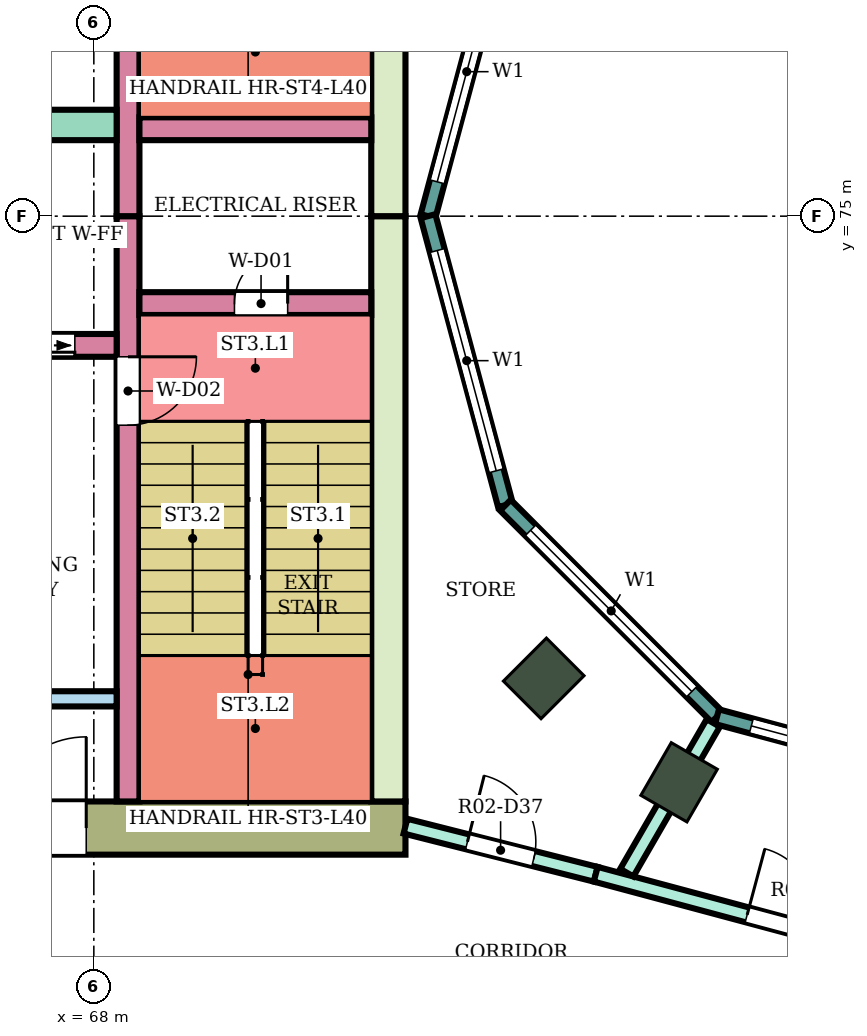
"""IFC4 building model, lengths in metres.
Left out: names, types, materials, properties, quantities, classifications, styles, units other than length and angle.
Written with IfcOpenShell. Run it as: python <this file> out.ifc"""

import sys

from ifc_helpers import new_model, si_unit, direction, frame, frame_2d, origin, origin_2d, place, context, subcontext, project, spatial, rectangle, extrude, element, fill, save


model = new_model("IFC4")
c1 = context("Model", 3, precision=1e-05, world=origin(), true_north=direction((0.0, 1.0)))
c2 = subcontext(c1, "Body", "Model", "MODEL_VIEW")
j1 = project(units=[si_unit("LENGTHUNIT", "METRE"), si_unit("PLANEANGLEUNIT", "RADIAN")], contexts=[c1])
p1 = place(None, origin())
s1 = spatial("IfcSite", under=j1, at=p1, CompositionType="ELEMENT")
p2 = place(p1, origin())
s2 = spatial("IfcBuilding", under=s1, at=p2, CompositionType="ELEMENT")
p3 = place(p2, frame((0.0, 0.0, 174.1)))
s3 = spatial("IfcBuildingStorey", under=s2, at=p3, CompositionType="ELEMENT", Elevation=174.1)
for number, where, z_axis, x_axis in (
    (1, (73.919, 68.919, 0.0), (0.0, 0.0, 1.0), (-0.707, -0.707, 0.0)),
    (2, (75.7, 67.552, 0.0), (0.0, 0.0, 1.0), (-0.5, -0.866, 0.0)),
):
    element("IfcColumn", number, at=place(p3, frame(where, z_axis=z_axis, x_axis=x_axis)), inside=s3, PredefinedType="COLUMN", context=c2, shape_type="SweptSolid", body=[
        extrude(rectangle(XDim=0.8, YDim=0.7, at=origin_2d()), origin(), (0.0, 0.0, 1.0), 4.1),
    ])
p4 = place(p3, frame((72.1, 66.95, 0.0), z_axis=(0.0, 0.0, 1.0), x_axis=(-1.0, 0.0, 0.0)))
e3 = element("IfcWall", 3, at=p4, inside=s3, PredefinedType="SHEAR", context=c2, shape_type="SweptSolid", body=[
    extrude(rectangle(XDim=14.8, YDim=0.7, at=frame_2d((7.4, 0.0))), origin(), (0.0, 0.0, 1.0), 3.78),
])
p5 = place(p4, frame((4.2, 0.0, 0.0)))
e4 = element("IfcOpeningElement", 4, at=p5, cuts=e3, PredefinedType="OPENING", context=c2, shape_type="SweptSolid", body=[
    extrude(rectangle(XDim=2.4, YDim=2.4, at=frame_2d((1.2, 1.2))), frame((0.0, 0.36, 0.0), z_axis=(0.0, -1.0, 0.0), x_axis=(1.0, 0.0, 0.0)), (0.0, 0.0, 1.0), 0.72),
])
for number, where, z_axis, x_axis in (
    (5, (71.875, 75.0, 0.0), (0.0, 0.0, 1.0), (0.0, -1.0, 0.0)),
    (6, (71.875, 82.7, 0.0), (0.0, 0.0, 1.0), (0.0, -1.0, 0.0)),
):
    element("IfcWall", number, at=place(p3, frame(where, z_axis=z_axis, x_axis=x_axis)), inside=s3, PredefinedType="SHEAR", context=c2, shape_type="SweptSolid", body=[
        extrude(rectangle(XDim=7.7, YDim=0.45, at=frame_2d((3.85, 0.0))), origin(), (0.0, 0.0, 1.0), 3.78),
    ])
p6 = place(p3, frame((68.45, 75.0, 0.0), z_axis=(0.0, 0.0, 1.0), x_axis=(0.0, -1.0, 0.0)))
e7 = element("IfcWall", 7, at=p6, inside=s3, PredefinedType="SHEAR", context=c2, shape_type="SweptSolid", body=[
    extrude(rectangle(XDim=7.7, YDim=0.3, at=frame_2d((3.85, 0.0))), origin(), (0.0, 0.0, 1.0), 3.78),
])
p7 = place(p6, frame((1.85, 0.0, 0.0)))
e8 = element("IfcOpeningElement", 8, at=p7, cuts=e7, PredefinedType="OPENING", context=c2, shape_type="SweptSolid", body=[
    extrude(rectangle(XDim=0.9, YDim=2.1, at=frame_2d((0.45, 1.05))), frame((0.0, 0.16, 0.0), z_axis=(0.0, -1.0, 0.0), x_axis=(1.0, 0.0, 0.0)), (0.0, 0.0, 1.0), 0.32),
])
p8 = place(p3, frame((68.45, 82.7, 0.0), z_axis=(0.0, 0.0, 1.0), x_axis=(0.0, -1.0, 0.0)))
e9 = element("IfcWall", 9, at=p8, inside=s3, PredefinedType="SHEAR", context=c2, shape_type="SweptSolid", body=[
    extrude(rectangle(XDim=7.7, YDim=0.3, at=frame_2d((3.85, 0.0))), origin(), (0.0, 0.0, 1.0), 3.78),
])
p9 = place(p8, frame((0.35, 0.0, 0.0)))
e10 = element("IfcOpeningElement", 10, at=p9, cuts=e9, PredefinedType="OPENING", context=c2, shape_type="SweptSolid", body=[
    extrude(rectangle(XDim=0.9, YDim=2.1, at=frame_2d((0.45, 1.05))), frame((0.0, 0.16, 0.0), z_axis=(0.0, -1.0, 0.0), x_axis=(1.0, 0.0, 0.0)), (0.0, 0.0, 1.0), 0.32),
])
p10 = place(p3, frame((71.65, 73.85, 0.0), z_axis=(0.0, 0.0, 1.0), x_axis=(-1.0, 0.0, 0.0)))
e11 = element("IfcWall", 11, at=p10, inside=s3, PredefinedType="SHEAR", context=c2, shape_type="SweptSolid", body=[
    extrude(rectangle(XDim=3.05, YDim=0.3, at=frame_2d((1.525, 0.0))), origin(), (0.0, 0.0, 1.0), 3.78),
])
p11 = place(p10, frame((1.1, 0.0, 0.0)))
e12 = element("IfcOpeningElement", 12, at=p11, cuts=e11, PredefinedType="OPENING", context=c2, shape_type="SweptSolid", body=[
    extrude(rectangle(XDim=0.7, YDim=2.0, at=frame_2d((0.35, 1.0))), frame((0.0, 0.16, 0.0), z_axis=(0.0, -1.0, 0.0), x_axis=(1.0, 0.0, 0.0)), (0.0, 0.0, 1.0), 0.32),
])
p12 = place(p3, frame((71.65, 76.15, 0.0), z_axis=(0.0, 0.0, 1.0), x_axis=(-1.0, 0.0, 0.0)))
e13 = element("IfcWall", 13, at=p12, inside=s3, PredefinedType="SHEAR", context=c2, shape_type="SweptSolid", body=[
    extrude(rectangle(XDim=3.05, YDim=0.3, at=frame_2d((1.525, 0.0))), origin(), (0.0, 0.0, 1.0), 3.78),
])
p13 = place(p3, frame((68.3, 73.3, 0.0), z_axis=(0.0, 0.0, 1.0), x_axis=(-1.0, 0.0, 0.0)))
e14 = element("IfcWall", 14, at=p13, inside=s3, PredefinedType="SHEAR", context=c2, shape_type="SweptSolid", body=[
    extrude(rectangle(XDim=11.0, YDim=0.3, at=frame_2d((5.5, 0.0))), origin(), (0.0, 0.0, 1.0), 3.78),
])
p14 = place(p13, frame((0.55, 0.0, 0.0)))
e15 = element("IfcOpeningElement", 15, at=p14, cuts=e14, PredefinedType="OPENING", context=c2, shape_type="SweptSolid", body=[
    extrude(rectangle(XDim=1.1, YDim=2.1, at=frame_2d((0.55, 1.05))), frame((0.0, 0.16, 0.0), z_axis=(0.0, -1.0, 0.0), x_axis=(1.0, 0.0, 0.0)), (0.0, 0.0, 1.0), 0.32),
])
p15 = place(p13, frame((3.0, 0.0, 0.0)))
e16 = element("IfcOpeningElement", 16, at=p15, cuts=e14, PredefinedType="OPENING", context=c2, shape_type="SweptSolid", body=[
    extrude(rectangle(XDim=1.2, YDim=2.1, at=frame_2d((0.6, 1.05))), frame((0.0, 0.16, 0.0), z_axis=(0.0, -1.0, 0.0), x_axis=(1.0, 0.0, 0.0)), (0.0, 0.0, 1.0), 0.32),
])
p16 = place(p13, frame((5.5, 0.0, 0.0)))
e17 = element("IfcOpeningElement", 17, at=p16, cuts=e14, PredefinedType="OPENING", context=c2, shape_type="SweptSolid", body=[
    extrude(rectangle(XDim=1.2, YDim=2.1, at=frame_2d((0.6, 1.05))), frame((0.0, 0.16, 0.0), z_axis=(0.0, -1.0, 0.0), x_axis=(1.0, 0.0, 0.0)), (0.0, 0.0, 1.0), 0.32),
])
p17 = place(p13, frame((7.75, 0.0, 0.0)))
e18 = element("IfcOpeningElement", 18, at=p17, cuts=e14, PredefinedType="OPENING", context=c2, shape_type="SweptSolid", body=[
    extrude(rectangle(XDim=0.9, YDim=2.1, at=frame_2d((0.45, 1.05))), frame((0.0, 0.16, 0.0), z_axis=(0.0, -1.0, 0.0), x_axis=(1.0, 0.0, 0.0)), (0.0, 0.0, 1.0), 0.32),
])
p18 = place(p13, frame((9.5, 0.0, 0.0)))
e19 = element("IfcOpeningElement", 19, at=p18, cuts=e14, PredefinedType="OPENING", context=c2, shape_type="SweptSolid", body=[
    extrude(rectangle(XDim=0.9, YDim=2.1, at=frame_2d((0.45, 1.05))), frame((0.0, 0.16, 0.0), z_axis=(0.0, -1.0, 0.0), x_axis=(1.0, 0.0, 0.0)), (0.0, 0.0, 1.0), 0.32),
])
p19 = place(p3, frame((68.3, 76.2, 0.0), z_axis=(0.0, 0.0, 1.0), x_axis=(-1.0, 0.0, 0.0)))
e20 = element("IfcWall", 20, at=p19, inside=s3, PredefinedType="SHEAR", context=c2, shape_type="SweptSolid", body=[
    extrude(rectangle(XDim=11.0, YDim=0.4, at=frame_2d((5.5, 0.0))), origin(), (0.0, 0.0, 1.0), 3.78),
])
p20 = place(p3, frame((68.3, 68.65, 0.0), z_axis=(0.0, 0.0, 1.0), x_axis=(-1.0, 0.0, 0.0)))
e21 = element("IfcWall", 21, at=p20, inside=s3, PredefinedType="SHEAR", context=c2, shape_type="SweptSolid", body=[
    extrude(rectangle(XDim=4.5, YDim=0.2, at=frame_2d((2.25, 0.0))), origin(), (0.0, 0.0, 1.0), 3.78),
])
p21 = place(p3, frame((73.415, 78.802, 0.0), z_axis=(0.0, 0.0, 1.0), x_axis=(-0.258789828301, -0.965933654434, 0.0)))
e22 = element("IfcWall", 22, at=p21, inside=s3, PredefinedType="NOTDEFINED", context=c2, shape_type="SweptSolid", body=[
    extrude(rectangle(XDim=3.936, YDim=0.2, at=frame_2d((1.968, 0.0))), origin(), (0.0, 0.0, 1.0), 4.1),
])
p22 = place(p21, frame((0.468, 0.0, 0.9)))
e23 = element("IfcOpeningElement", 23, at=p22, cuts=e22, PredefinedType="OPENING", context=c2, shape_type="SweptSolid", body=[
    extrude(rectangle(XDim=3.0, YDim=2.3, at=frame_2d((1.5, 1.15))), frame((0.0, 0.11, 0.0), z_axis=(0.0, -1.0, 0.0), x_axis=(1.0, 0.0, 0.0)), (0.0, 0.0, 1.0), 0.22),
])
p23 = place(p3, frame((72.396, 75.0, 0.0), z_axis=(0.0, 0.0, 1.0), x_axis=(0.258789828301, -0.965933654434, 0.0)))
e24 = element("IfcWall", 24, at=p23, inside=s3, PredefinedType="NOTDEFINED", context=c2, shape_type="SweptSolid", body=[
    extrude(rectangle(XDim=3.936, YDim=0.2, at=frame_2d((1.968, 0.0))), origin(), (0.0, 0.0, 1.0), 4.1),
])
p24 = place(p23, frame((0.468, 0.0, 0.9)))
e25 = element("IfcOpeningElement", 25, at=p24, cuts=e24, PredefinedType="OPENING", context=c2, shape_type="SweptSolid", body=[
    extrude(rectangle(XDim=3.0, YDim=2.3, at=frame_2d((1.5, 1.15))), frame((0.0, 0.11, 0.0), z_axis=(0.0, -1.0, 0.0), x_axis=(1.0, 0.0, 0.0)), (0.0, 0.0, 1.0), 0.22),
])
p25 = place(p3, frame((73.415, 71.198, 0.0), z_axis=(0.0, 0.0, 1.0), x_axis=(0.707106781187, -0.707106781187, 0.0)))
e26 = element("IfcWall", 26, at=p25, inside=s3, PredefinedType="NOTDEFINED", context=c2, shape_type="SweptSolid", body=[
    extrude(rectangle(XDim=3.936, YDim=0.2, at=frame_2d((1.968, 0.0))), origin(), (0.0, 0.0, 1.0), 4.1),
])
p26 = place(p25, frame((0.468, 0.0, 0.9)))
e27 = element("IfcOpeningElement", 27, at=p26, cuts=e26, PredefinedType="OPENING", context=c2, shape_type="SweptSolid", body=[
    extrude(rectangle(XDim=3.0, YDim=2.3, at=frame_2d((1.5, 1.15))), frame((0.0, 0.11, 0.0), z_axis=(0.0, -1.0, 0.0), x_axis=(1.0, 0.0, 0.0)), (0.0, 0.0, 1.0), 0.22),
])
p27 = place(p3, frame((76.198, 68.415, 0.0), z_axis=(0.0, 0.0, 1.0), x_axis=(0.965933654434, -0.258789828301, 0.0)))
e28 = element("IfcWall", 28, at=p27, inside=s3, PredefinedType="NOTDEFINED", context=c2, shape_type="SweptSolid", body=[
    extrude(rectangle(XDim=3.936, YDim=0.2, at=frame_2d((1.968, 0.0))), origin(), (0.0, 0.0, 1.0), 4.1),
])
p28 = place(p27, frame((0.468, 0.0, 0.9)))
e29 = element("IfcOpeningElement", 29, at=p28, cuts=e28, PredefinedType="OPENING", context=c2, shape_type="SweptSolid", body=[
    extrude(rectangle(XDim=3.0, YDim=2.3, at=frame_2d((1.5, 1.15))), frame((0.0, 0.11, 0.0), z_axis=(0.0, -1.0, 0.0), x_axis=(1.0, 0.0, 0.0)), (0.0, 0.0, 1.0), 0.22),
])
p29 = place(p3, frame((72.1, 66.975, 0.0), z_axis=(0.0, 0.0, 1.0), x_axis=(0.969471314457, -0.245204752086, 0.0)))
e30 = element("IfcWall", 30, at=p29, inside=s3, PredefinedType="PARTITIONING", context=c2, shape_type="SweptSolid", body=[
    extrude(rectangle(XDim=2.582, YDim=0.2, at=frame_2d((1.291, 0.0))), origin(), (0.0, 0.0, 1.0), 3.65),
])
p30 = place(p29, frame((0.841, 0.0, 0.0)))
e31 = element("IfcOpeningElement", 31, at=p30, cuts=e30, PredefinedType="OPENING", context=c2, shape_type="SweptSolid", body=[
    extrude(rectangle(XDim=0.9, YDim=2.1, at=frame_2d((0.45, 1.05))), frame((0.0, 0.11, 0.0), z_axis=(0.0, -1.0, 0.0), x_axis=(1.0, 0.0, 0.0)), (0.0, 0.0, 1.0), 0.22),
])
p31 = place(p3, frame((74.603, 66.342, 0.0), z_axis=(0.0, 0.0, 1.0), x_axis=(0.965895298152, -0.258932950796, 0.0)))
e32 = element("IfcWall", 32, at=p31, inside=s3, PredefinedType="PARTITIONING", context=c2, shape_type="SweptSolid", body=[
    extrude(rectangle(XDim=5.538, YDim=0.2, at=frame_2d((2.769, 0.0))), origin(), (0.0, 0.0, 1.0), 3.65),
])
p32 = place(p31, frame((2.062, 0.0, 0.0)))
e33 = element("IfcOpeningElement", 33, at=p32, cuts=e32, PredefinedType="OPENING", context=c2, shape_type="SweptSolid", body=[
    extrude(rectangle(XDim=1.8, YDim=2.1, at=frame_2d((0.9, 1.05))), frame((0.0, 0.11, 0.0), z_axis=(0.0, -1.0, 0.0), x_axis=(1.0, 0.0, 0.0)), (0.0, 0.0, 1.0), 0.22),
])
p33 = place(p3, frame((75.012, 66.363, 0.0), z_axis=(0.0, 0.0, 1.0), x_axis=(0.500168489725, 0.86592810434, 0.0)))
e34 = element("IfcWall", 34, at=p33, inside=s3, PredefinedType="PARTITIONING", context=c2, shape_type="SweptSolid", body=[
    extrude(rectangle(XDim=2.274, YDim=0.2, at=frame_2d((1.137, 0.0))), origin(), (0.0, 0.0, 1.0), 3.65),
])
p34 = place(p22, origin())
e35 = element("IfcWindow", 35, at=p34, inside=s3, PartitioningType="SINGLE_PANEL", PredefinedType="WINDOW", context=c2, shape_type="SweptSolid", body=[
    extrude(rectangle(XDim=3.0, YDim=2.3, at=frame_2d((1.5, 1.15))), frame((0.0, 0.03, 0.0), z_axis=(0.0, -1.0, 0.0), x_axis=(1.0, 0.0, 0.0)), (0.0, 0.0, 1.0), 0.06),
])
fill(e23, e35)
p35 = place(p24, origin())
e36 = element("IfcWindow", 36, at=p35, inside=s3, PartitioningType="SINGLE_PANEL", PredefinedType="WINDOW", context=c2, shape_type="SweptSolid", body=[
    extrude(rectangle(XDim=3.0, YDim=2.3, at=frame_2d((1.5, 1.15))), frame((0.0, 0.03, 0.0), z_axis=(0.0, -1.0, 0.0), x_axis=(1.0, 0.0, 0.0)), (0.0, 0.0, 1.0), 0.06),
])
fill(e25, e36)
p36 = place(p26, origin())
e37 = element("IfcWindow", 37, at=p36, inside=s3, PartitioningType="SINGLE_PANEL", PredefinedType="WINDOW", context=c2, shape_type="SweptSolid", body=[
    extrude(rectangle(XDim=3.0, YDim=2.3, at=frame_2d((1.5, 1.15))), frame((0.0, 0.03, 0.0), z_axis=(0.0, -1.0, 0.0), x_axis=(1.0, 0.0, 0.0)), (0.0, 0.0, 1.0), 0.06),
])
fill(e27, e37)
p37 = place(p28, origin())
e38 = element("IfcWindow", 38, at=p37, inside=s3, PartitioningType="SINGLE_PANEL", PredefinedType="WINDOW", context=c2, shape_type="SweptSolid", body=[
    extrude(rectangle(XDim=3.0, YDim=2.3, at=frame_2d((1.5, 1.15))), frame((0.0, 0.03, 0.0), z_axis=(0.0, -1.0, 0.0), x_axis=(1.0, 0.0, 0.0)), (0.0, 0.0, 1.0), 0.06),
])
fill(e29, e38)
p38 = place(p32, origin())
e39 = element("IfcDoor", 39, at=p38, inside=s3, OperationType="DOUBLE_DOOR_SINGLE_SWING", PredefinedType="DOOR", context=c2, shape_type="SweptSolid", body=[
    extrude(rectangle(XDim=1.8, YDim=2.1, at=frame_2d((0.9, 1.05))), frame((0.0, 0.025, 0.0), z_axis=(0.0, -1.0, 0.0), x_axis=(1.0, 0.0, 0.0)), (0.0, 0.0, 1.0), 0.05),
])
fill(e33, e39)
p39 = place(p30, origin())
e40 = element("IfcDoor", 40, at=p39, inside=s3, OperationType="SINGLE_SWING_LEFT", PredefinedType="DOOR", context=c2, shape_type="SweptSolid", body=[
    extrude(rectangle(XDim=0.9, YDim=2.1, at=frame_2d((0.45, 1.05))), frame((0.0, 0.025, 0.0), z_axis=(0.0, -1.0, 0.0), x_axis=(1.0, 0.0, 0.0)), (0.0, 0.0, 1.0), 0.05),
])
fill(e31, e40)
p40 = place(p11, frame((0.7, 0.0, 0.0), z_axis=(0.0, 0.0, 1.0), x_axis=(-1.0, 0.0, 0.0)))
e41 = element("IfcDoor", 41, at=p40, inside=s3, OperationType="SINGLE_SWING_RIGHT", PredefinedType="DOOR", context=c2, shape_type="SweptSolid", body=[
    extrude(rectangle(XDim=0.7, YDim=2.0, at=frame_2d((0.35, 1.0))), frame((0.0, 0.025, 0.0), z_axis=(0.0, -1.0, 0.0), x_axis=(1.0, 0.0, 0.0)), (0.0, 0.0, 1.0), 0.05),
])
fill(e12, e41)
p41 = place(p7, origin())
e42 = element("IfcDoor", 42, at=p41, inside=s3, OperationType="SINGLE_SWING_LEFT", PredefinedType="DOOR", context=c2, shape_type="SweptSolid", body=[
    extrude(rectangle(XDim=0.9, YDim=2.1, at=frame_2d((0.45, 1.05))), frame((0.0, 0.025, 0.0), z_axis=(0.0, -1.0, 0.0), x_axis=(1.0, 0.0, 0.0)), (0.0, 0.0, 1.0), 0.05),
])
fill(e8, e42)
p42 = place(p14, origin())
e43 = element("IfcDoor", 43, at=p42, inside=s3, OperationType="DOUBLE_DOOR_SLIDING", PredefinedType="DOOR", context=c2, shape_type="SweptSolid", body=[
    extrude(rectangle(XDim=1.1, YDim=2.1, at=frame_2d((0.55, 1.05))), frame((0.0, 0.025, 0.0), z_axis=(0.0, -1.0, 0.0), x_axis=(1.0, 0.0, 0.0)), (0.0, 0.0, 1.0), 0.05),
])
fill(e15, e43)
p43 = place(p5, frame((2.4, 0.0, 0.0), z_axis=(0.0, 0.0, 1.0), x_axis=(-1.0, 0.0, 0.0)))
e44 = element("IfcDoor", 44, at=p43, inside=s3, OperationType="DOUBLE_DOOR_SINGLE_SWING", PredefinedType="DOOR", context=c2, shape_type="SweptSolid", body=[
    extrude(rectangle(XDim=2.4, YDim=2.4, at=frame_2d((1.2, 1.2))), frame((0.0, 0.025, 0.0), z_axis=(0.0, -1.0, 0.0), x_axis=(1.0, 0.0, 0.0)), (0.0, 0.0, 1.0), 0.05),
])
fill(e4, e44)
save(model, sys.argv[1])
